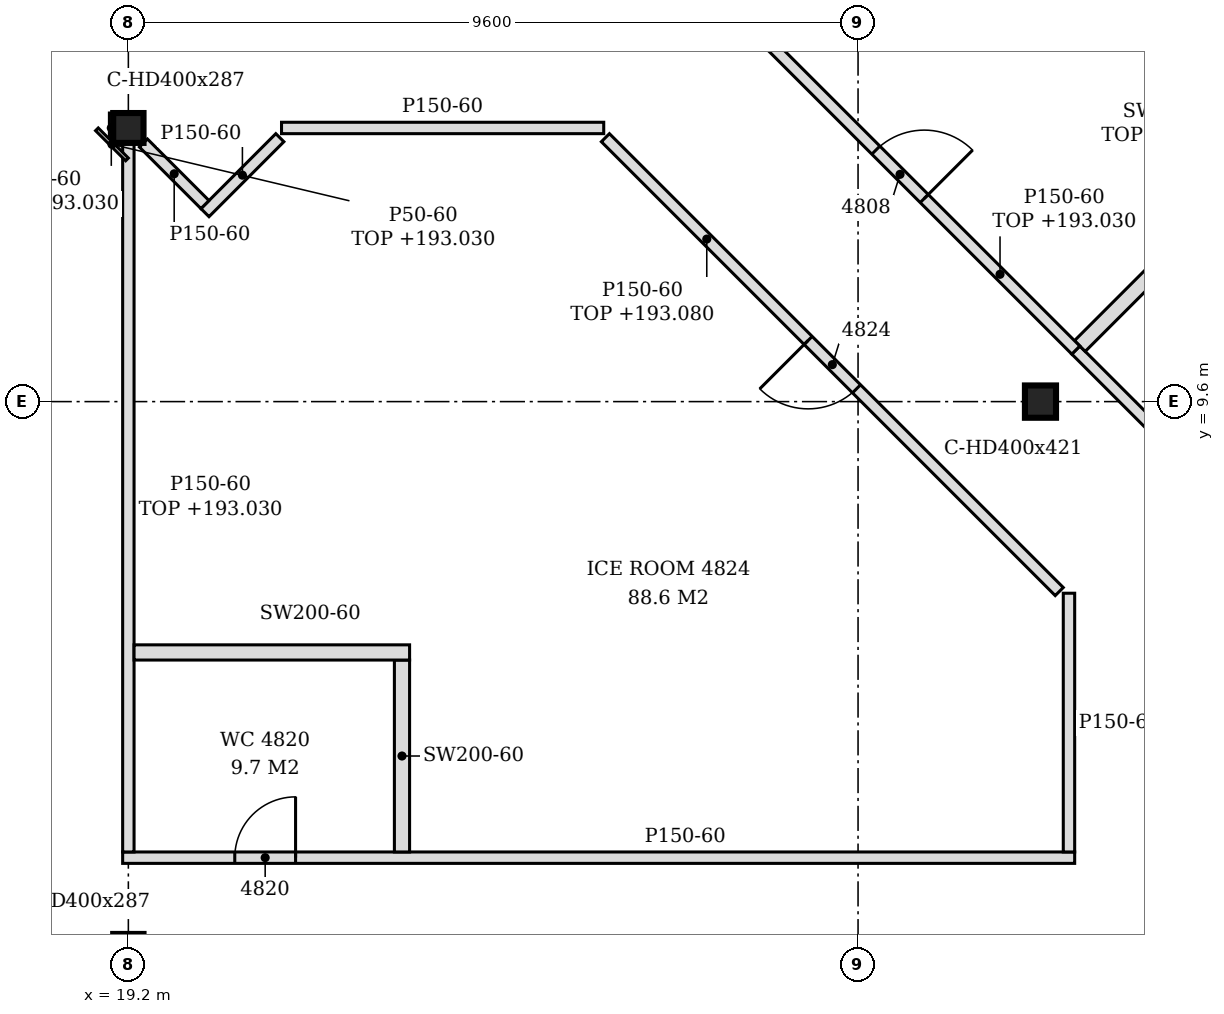
"""IFC4 building model, lengths in metres.
Left out: names, types, materials, properties, quantities, classifications, styles, units other than length and angle.
Written with IfcOpenShell. Run it as: python <this file> out.ifc"""

import sys

from ifc_helpers import new_model, si_unit, direction, frame, frame_2d, origin, origin_2d, place, context, subcontext, project, spatial, polyline, rectangle, i_section, outline, extrude, element, fill, save


model = new_model("IFC4")
c1 = context("Model", 3, precision=1e-05, world=origin(), true_north=direction((0.0, 1.0)))
c2 = subcontext(c1, "Body", "Model", "MODEL_VIEW")
j1 = project(units=[si_unit("LENGTHUNIT", "METRE"), si_unit("PLANEANGLEUNIT", "RADIAN")], contexts=[c1])
p1 = place(None, origin())
s1 = spatial("IfcSite", under=j1, at=p1, CompositionType="ELEMENT")
p2 = place(p1, origin())
s2 = spatial("IfcBuilding", under=s1, at=p2, CompositionType="ELEMENT")
p3 = place(p2, frame((0.0, 0.0, 190.2)))
s3 = spatial("IfcBuildingStorey", under=s2, at=p3, CompositionType="ELEMENT", Elevation=190.2)
p4 = place(p3, frame((19.2, 13.2, -0.15), z_axis=(0.0, 0.0, 1.0), x_axis=(1.0, 0.0, 0.0)))
e1 = element("IfcColumn", 1, at=p4, inside=s3, PredefinedType="COLUMN", context=c2, shape_type="SweptSolid", body=[
    extrude(i_section(OverallWidth=0.399, OverallDepth=0.393, WebThickness=0.023, FlangeThickness=0.037, FilletRadius=0.015, at=origin_2d()), origin(), (0.0, 0.0, 1.0), 3.6),
])
p5 = place(p3, frame((31.2, 9.6, -0.15), z_axis=(0.0, 0.0, 1.0), x_axis=(1.0, 0.0, 0.0)))
e2 = element("IfcColumn", 2, at=p5, inside=s3, PredefinedType="COLUMN", context=c2, shape_type="SweptSolid", body=[
    extrude(i_section(OverallWidth=0.409, OverallDepth=0.425, WebThickness=0.033, FlangeThickness=0.052, FilletRadius=0.015, at=origin_2d()), origin(), (0.0, 0.0, 1.0), 3.6),
])
p6 = place(p3, frame((19.125, 3.6, 0.0), z_axis=(0.0, 0.0, 1.0), x_axis=(1.0, 0.0, 0.0)))
e3 = element("IfcWall", 3, at=p6, inside=s3, PredefinedType="PARTITIONING", context=c2, shape_type="SweptSolid", body=[
    extrude(outline(polyline([(0.0, 0.0), (12.525, 0.0), (12.525, 3.45), (12.225, 3.45), (12.223, 2.93), (11.925, 2.93), (11.923, 3.45), (0.225, 3.45), (0.223, 2.83), (0.0, 2.83), (0.0, 0.0)])), frame((0.0, 0.075, 0.0), z_axis=(0.0, -1.0, 0.0), x_axis=(1.0, 0.0, 0.0)), (0.0, 0.0, 1.0), 0.15),
])
p7 = place(p6, frame((1.475, 0.0, 0.0)))
e4 = element("IfcOpeningElement", 4, at=p7, cuts=e3, PredefinedType="OPENING", context=c2, shape_type="SweptSolid", body=[
    extrude(rectangle(XDim=0.8, YDim=2.1, at=frame_2d((0.4, 1.05))), frame((0.0, 0.085, 0.0), z_axis=(0.0, -1.0, 0.0), x_axis=(1.0, 0.0, 0.0)), (0.0, 0.0, 1.0), 0.17),
])
p8 = place(p3, frame((19.2, 3.675, 0.0), z_axis=(0.0, 0.0, 1.0), x_axis=(0.0, 1.0, 0.0)))
e5 = element("IfcWall", 5, at=p8, inside=s3, PredefinedType="PARTITIONING", context=c2, shape_type="SweptSolid", body=[
    extrude(rectangle(XDim=9.328, YDim=0.15, at=frame_2d((4.664, 0.0))), origin(), (0.0, 0.0, 1.0), 2.83),
])
p9 = place(p3, frame((22.8, 3.675, 0.0), z_axis=(0.0, 0.0, 1.0), x_axis=(0.0, 1.0, 0.0)))
e6 = element("IfcWall", 6, at=p9, inside=s3, PredefinedType="PARTITIONING", context=c2, shape_type="SweptSolid", body=[
    extrude(outline(polyline([(0.0, 0.0), (2.525, 0.0), (2.525, 3.45), (1.83, 3.45), (1.828, 2.88), (1.62, 2.88), (1.618, 3.45), (0.0, 3.45), (0.0, 0.0)])), frame((0.0, 0.1, 0.0), z_axis=(0.0, -1.0, 0.0), x_axis=(1.0, 0.0, 0.0)), (0.0, 0.0, 1.0), 0.2),
])
p10 = place(p3, frame((31.575, 3.675, 0.0), z_axis=(0.0, 0.0, 1.0), x_axis=(0.0, 1.0, 0.0)))
e7 = element("IfcWall", 7, at=p10, inside=s3, PredefinedType="PARTITIONING", context=c2, shape_type="SweptSolid", body=[
    extrude(outline(polyline([(0.0, 0.0), (3.404, 0.0), (3.404, 3.45), (1.825, 3.45), (1.823, 2.93), (1.625, 2.93), (1.623, 3.45), (0.0, 3.45), (0.0, 0.0)])), frame((0.0, 0.075, 0.0), z_axis=(0.0, -1.0, 0.0), x_axis=(1.0, 0.0, 0.0)), (0.0, 0.0, 1.0), 0.15),
])
p11 = place(p3, frame((19.275, 6.3, 0.0), z_axis=(0.0, 0.0, 1.0), x_axis=(1.0, 0.0, 0.0)))
e8 = element("IfcWall", 8, at=p11, inside=s3, PredefinedType="PARTITIONING", context=c2, shape_type="SweptSolid", body=[
    extrude(outline(polyline([(0.0, 0.0), (3.625, 0.0), (3.625, 3.45), (0.075, 3.45), (0.073, 2.83), (0.0, 2.83), (0.0, 0.0)])), frame((0.0, 0.1, 0.0), z_axis=(0.0, -1.0, 0.0), x_axis=(1.0, 0.0, 0.0)), (0.0, 0.0, 1.0), 0.2),
])
p12 = place(p3, frame((31.447, 7.101, 0.0), z_axis=(0.0, 0.0, 1.0), x_axis=(-0.707106781187, 0.707106781187, 0.0)))
e9 = element("IfcWall", 9, at=p12, inside=s3, PredefinedType="PARTITIONING", context=c2, shape_type="SweptSolid", body=[
    extrude(rectangle(XDim=8.444, YDim=0.15, at=frame_2d((4.222, 0.0))), origin(), (0.0, 0.0, 1.0), 2.88),
])
p13 = place(p12, frame((3.772, 0.0, 0.0)))
e10 = element("IfcOpeningElement", 10, at=p13, cuts=e9, PredefinedType="OPENING", context=c2, shape_type="SweptSolid", body=[
    extrude(rectangle(XDim=0.9, YDim=2.1, at=frame_2d((0.45, 1.05))), frame((0.0, 0.085, 0.0), z_axis=(0.0, -1.0, 0.0), x_axis=(1.0, 0.0, 0.0)), (0.0, 0.0, 1.0), 0.17),
])
p14 = place(p3, frame((33.847, 8.096, 0.0), z_axis=(0.0, 0.0, 1.0), x_axis=(-0.707067221659, 0.707146338501, 0.0)))
e11 = element("IfcWall", 11, at=p14, inside=s3, PredefinedType="PARTITIONING", context=c2, shape_type="SweptSolid", body=[
    extrude(rectangle(XDim=3.086, YDim=0.15, at=frame_2d((1.543, 0.0))), origin(), (0.0, 0.0, 1.0), 2.93),
])
p15 = place(p3, frame((31.718, 10.331, 0.0), z_axis=(0.0, 0.0, 1.0), x_axis=(0.707127584869, 0.707085976892, 0.0)))
e12 = element("IfcWall", 12, at=p15, inside=s3, PredefinedType="PARTITIONING", context=c2, shape_type="SweptSolid", body=[
    extrude(rectangle(XDim=5.868, YDim=0.2, at=frame_2d((2.934, 0.0))), origin(), (0.0, 0.0, 1.0), 2.93),
])
p16 = place(p3, frame((31.665, 10.278, 0.0), z_axis=(0.0, 0.0, 1.0), x_axis=(-0.707201548562, 0.707012001109, 0.0)))
e13 = element("IfcWall", 13, at=p16, inside=s3, PredefinedType="PARTITIONING", context=c2, shape_type="SweptSolid", body=[
    extrude(rectangle(XDim=6.44, YDim=0.15, at=frame_2d((3.22, 0.0))), origin(), (0.0, 0.0, 1.0), 2.83),
])
p17 = place(p16, frame((2.82, 0.0, 0.0)))
e14 = element("IfcOpeningElement", 14, at=p17, cuts=e13, PredefinedType="OPENING", context=c2, shape_type="SweptSolid", body=[
    extrude(rectangle(XDim=0.9, YDim=2.1, at=frame_2d((0.45, 1.05))), frame((0.0, 0.085, 0.0), z_axis=(0.0, -1.0, 0.0), x_axis=(1.0, 0.0, 0.0)), (0.0, 0.0, 1.0), 0.17),
])
p18 = place(p3, frame((20.208, 12.086, 0.0), z_axis=(0.0, 0.0, 1.0), x_axis=(0.706756381459, 0.707457007363, 0.0)))
e15 = element("IfcWall", 15, at=p18, inside=s3, PredefinedType="PARTITIONING", context=c2, shape_type="SweptSolid", body=[
    extrude(rectangle(XDim=1.394, YDim=0.15, at=frame_2d((0.697, 0.0))), origin(), (0.0, 0.0, 1.0), 3.45),
])
p19 = place(p3, frame((20.208, 12.192, 0.0), z_axis=(0.0, 0.0, 1.0), x_axis=(-0.70721334539, 0.707000200921, 0.0)))
e16 = element("IfcWall", 16, at=p19, inside=s3, PredefinedType="PARTITIONING", context=c2, shape_type="SweptSolid", body=[
    extrude(rectangle(XDim=1.146, YDim=0.15, at=frame_2d((0.573, 0.0))), origin(), (0.0, 0.0, 1.0), 3.45),
])
p20 = place(p3, frame((21.215, 13.2, 0.0), z_axis=(0.0, 0.0, 1.0), x_axis=(1.0, 0.0, 0.0)))
e17 = element("IfcWall", 17, at=p20, inside=s3, PredefinedType="PARTITIONING", context=c2, shape_type="SweptSolid", body=[
    extrude(rectangle(XDim=4.239, YDim=0.15, at=frame_2d((2.12, 0.0))), origin(), (0.0, 0.0, 1.0), 3.45),
])
p21 = place(p3, frame((18.976, 13.003, 0.0), z_axis=(0.0, 0.0, 1.0), x_axis=(0.0, 1.0, 0.0)))
e18 = element("IfcWall", 18, at=p21, inside=s3, PredefinedType="PARTITIONING", context=c2, shape_type="SweptSolid", body=[
    extrude(rectangle(XDim=0.393, YDim=0.05, at=frame_2d((0.197, 0.0))), origin(), (0.0, 0.0, 1.0), 2.83),
])
p22 = place(p3, frame((19.182, 12.786, 0.0), z_axis=(0.0, 0.0, 1.0), x_axis=(-0.707106781187, 0.707106781187, 0.0)))
e19 = element("IfcWall", 19, at=p22, inside=s3, PredefinedType="PARTITIONING", context=c2, shape_type="SweptSolid", body=[
    extrude(rectangle(XDim=0.56, YDim=0.05, at=frame_2d((0.28, 0.0))), origin(), (0.0, 0.0, 1.0), 2.83),
])
p23 = place(p17, frame((0.9, 0.0, 0.0), z_axis=(0.0, 0.0, 1.0), x_axis=(-1.0, 0.0, 0.0)))
e20 = element("IfcDoor", 20, at=p23, inside=s3, OperationType="SINGLE_SWING_RIGHT", PredefinedType="DOOR", context=c2, shape_type="SweptSolid", body=[
    extrude(rectangle(XDim=0.9, YDim=2.1, at=frame_2d((0.45, 1.05))), frame((0.0, 0.025, 0.0), z_axis=(0.0, -1.0, 0.0), x_axis=(1.0, 0.0, 0.0)), (0.0, 0.0, 1.0), 0.05),
])
fill(e14, e20)
p24 = place(p7, origin())
e21 = element("IfcDoor", 21, at=p24, inside=s3, OperationType="SINGLE_SWING_RIGHT", PredefinedType="DOOR", context=c2, shape_type="SweptSolid", body=[
    extrude(rectangle(XDim=0.8, YDim=2.1, at=frame_2d((0.4, 1.05))), frame((0.0, 0.025, 0.0), z_axis=(0.0, -1.0, 0.0), x_axis=(1.0, 0.0, 0.0)), (0.0, 0.0, 1.0), 0.05),
])
fill(e4, e21)
p25 = place(p13, origin())
e22 = element("IfcDoor", 22, at=p25, inside=s3, OperationType="SINGLE_SWING_RIGHT", PredefinedType="DOOR", context=c2, shape_type="SweptSolid", body=[
    extrude(rectangle(XDim=0.9, YDim=2.1, at=frame_2d((0.45, 1.05))), frame((0.0, 0.025, 0.0), z_axis=(0.0, -1.0, 0.0), x_axis=(1.0, 0.0, 0.0)), (0.0, 0.0, 1.0), 0.05),
])
fill(e10, e22)
save(model, sys.argv[1])
